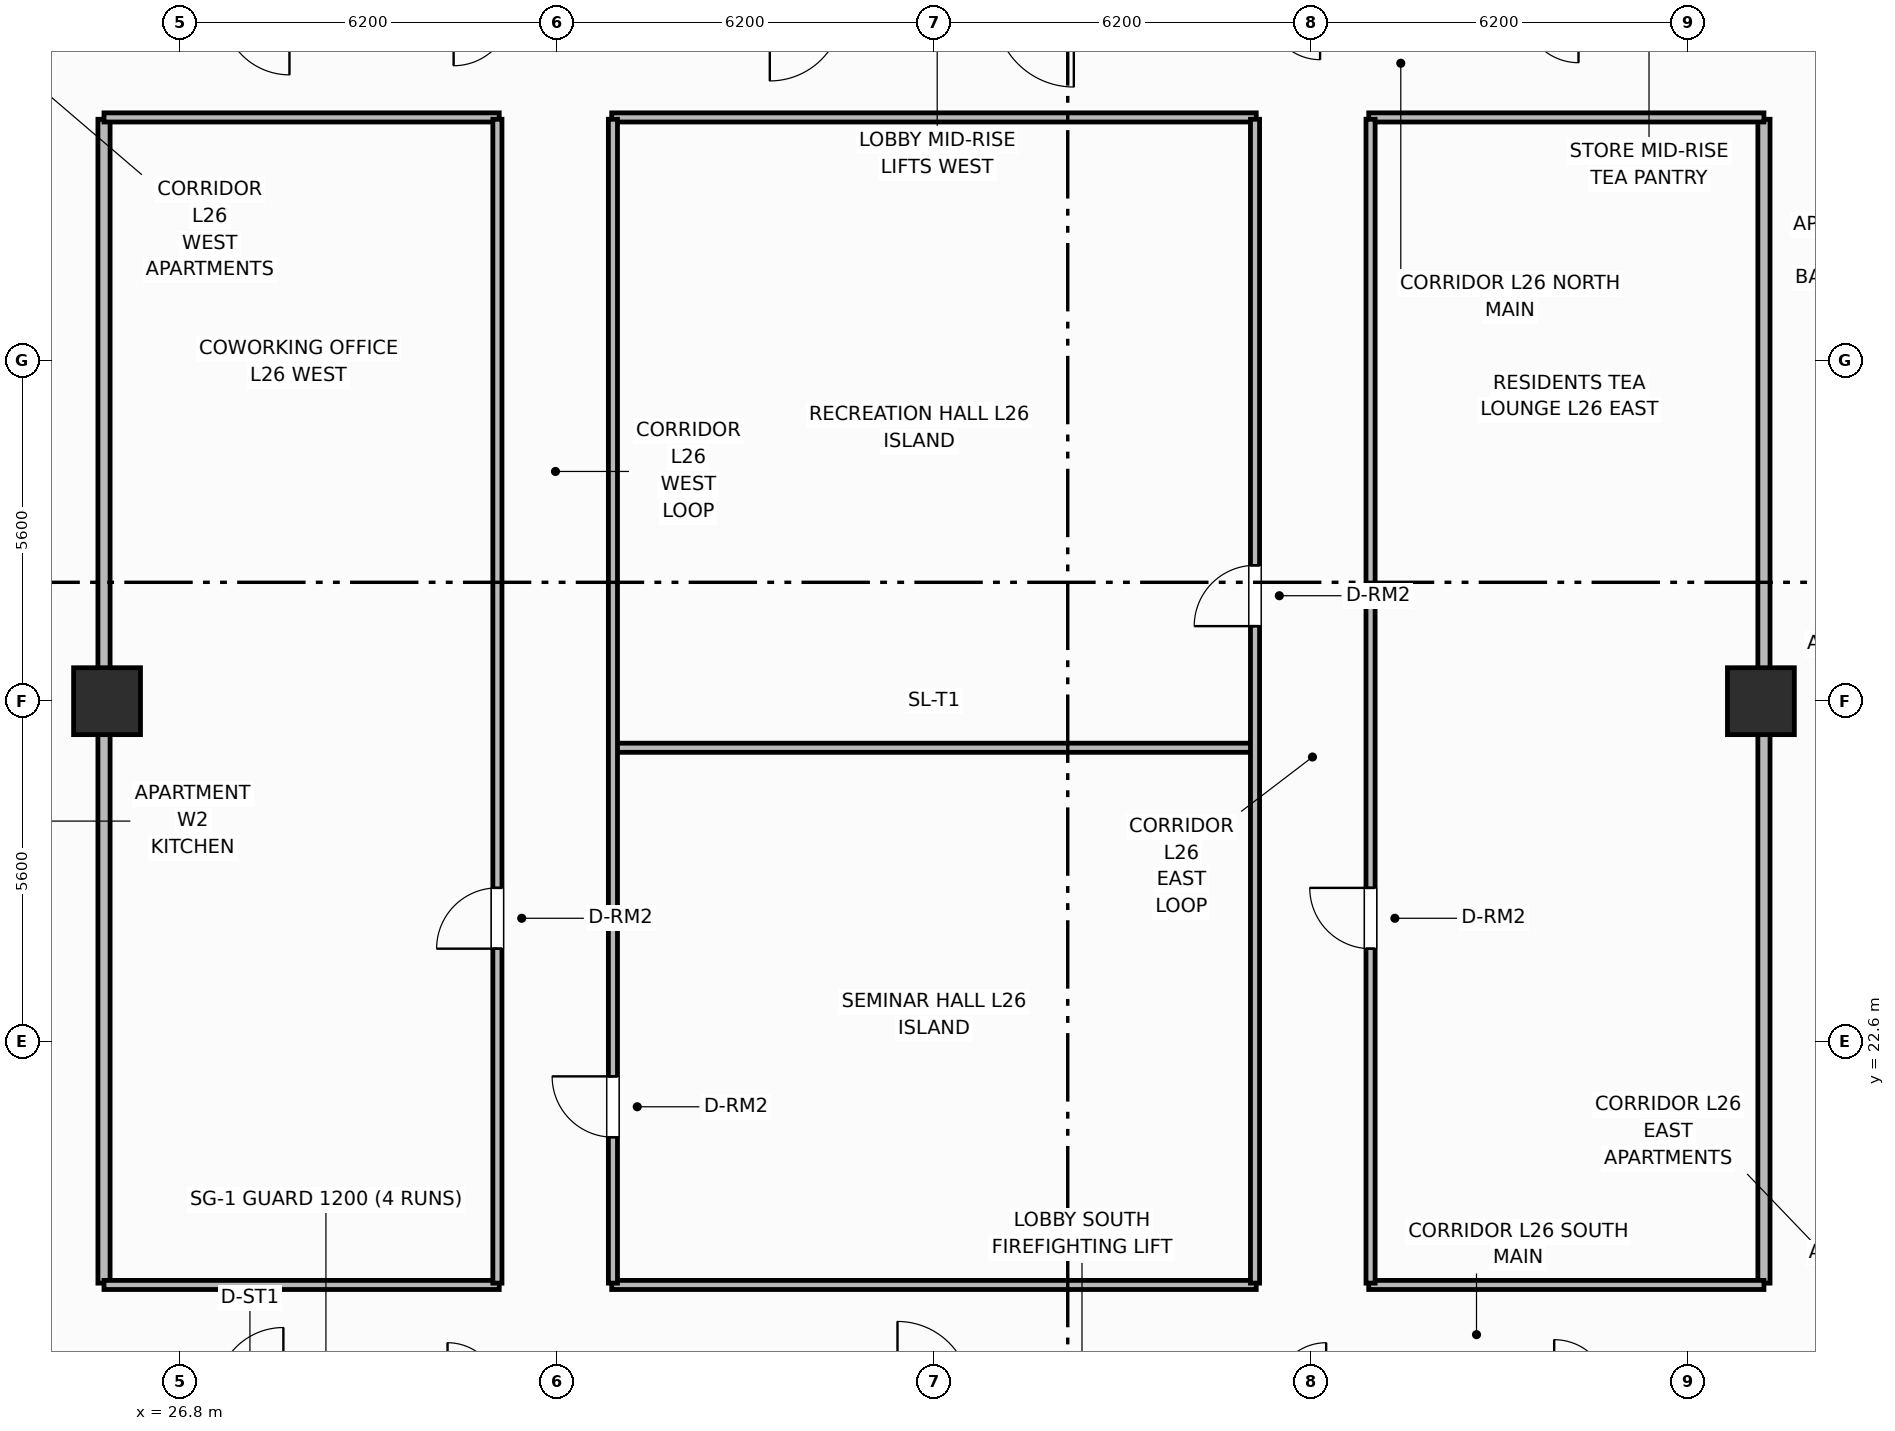
"""IFC4 building model, lengths in metres.
Left out: names, types, materials, properties, quantities, classifications, styles, units other than length and angle.
Written with IfcOpenShell. Run it as: python <this file> out.ifc"""

import sys

from ifc_helpers import new_model, si_unit, direction, frame, frame_2d, origin, origin_2d, place, context, subcontext, project, spatial, rectangle, extrude, element, fill, save


model = new_model("IFC4")
c1 = context("Model", 3, precision=1e-05, world=origin(), true_north=direction((0.0, 1.0)))
c2 = subcontext(c1, "Body", "Model", "MODEL_VIEW")
j1 = project(units=[si_unit("LENGTHUNIT", "METRE"), si_unit("PLANEANGLEUNIT", "RADIAN")], contexts=[c1])
p1 = place(None, origin())
s1 = spatial("IfcSite", under=j1, at=p1, CompositionType="ELEMENT")
p2 = place(p1, origin())
s2 = spatial("IfcBuilding", under=s1, at=p2, CompositionType="ELEMENT")
p3 = place(p2, frame((0.0, 0.0, 106.8)))
s3 = spatial("IfcBuildingStorey", under=s2, at=p3, CompositionType="ELEMENT", Elevation=106.8)
for number, where, z_axis, x_axis in (
    (1, (25.6, 28.2, 0.0), (0.0, 0.0, 1.0), (1.0, 0.0, 0.0)),
    (2, (52.8, 28.2, 0.0), (0.0, 0.0, 1.0), (1.0, 0.0, 0.0)),
):
    element("IfcColumn", number, at=place(p3, frame(where, z_axis=z_axis, x_axis=x_axis)), inside=s3, PredefinedType="COLUMN", context=c2, shape_type="SweptSolid", body=[
        extrude(rectangle(XDim=1.1, YDim=1.1, at=origin_2d()), origin(), (0.0, 0.0, 1.0), 3.7),
    ])
for number, where, z_axis, x_axis in (
    (3, (25.55, 18.63, 0.0), (0.0, 0.0, 1.0), (0.0, 1.0, 0.0)),
    (4, (52.85, 18.63, 0.0), (0.0, 0.0, 1.0), (0.0, 1.0, 0.0)),
):
    element("IfcWall", number, at=place(p3, frame(where, z_axis=z_axis, x_axis=x_axis)), inside=s3, PredefinedType="PARTITIONING", context=c2, shape_type="SweptSolid", body=[
        extrude(rectangle(XDim=19.14, YDim=0.2, at=frame_2d((9.57, 0.0))), origin(), (0.0, 0.0, 1.0), 2.53),
    ])
for number, where, z_axis, x_axis in (
    (5, (25.55, 18.6, 0.0), (0.0, 0.0, 1.0), (1.0, 0.0, 0.0)),
    (6, (25.55, 37.8, 0.0), (0.0, 0.0, 1.0), (1.0, 0.0, 0.0)),
):
    element("IfcWall", number, at=place(p3, frame(where, z_axis=z_axis, x_axis=x_axis)), inside=s3, PredefinedType="PARTITIONING", context=c2, shape_type="SweptSolid", body=[
        extrude(rectangle(XDim=6.5, YDim=0.15, at=frame_2d((3.25, 0.0))), origin(), (0.0, 0.0, 1.0), 2.53),
    ])
for number, where, z_axis, x_axis in (
    (7, (33.9, 18.6, 0.0), (0.0, 0.0, 1.0), (1.0, 0.0, 0.0)),
    (8, (33.9, 37.8, 0.0), (0.0, 0.0, 1.0), (1.0, 0.0, 0.0)),
):
    element("IfcWall", number, at=place(p3, frame(where, z_axis=z_axis, x_axis=x_axis)), inside=s3, PredefinedType="PARTITIONING", context=c2, shape_type="SweptSolid", body=[
        extrude(rectangle(XDim=10.6, YDim=0.15, at=frame_2d((5.3, 0.0))), origin(), (0.0, 0.0, 1.0), 2.53),
    ])
for number, where, z_axis, x_axis in (
    (9, (46.35, 18.6, 0.0), (0.0, 0.0, 1.0), (1.0, 0.0, 0.0)),
    (10, (46.35, 37.8, 0.0), (0.0, 0.0, 1.0), (1.0, 0.0, 0.0)),
):
    element("IfcWall", number, at=place(p3, frame(where, z_axis=z_axis, x_axis=x_axis)), inside=s3, PredefinedType="PARTITIONING", context=c2, shape_type="SweptSolid", body=[
        extrude(rectangle(XDim=6.5, YDim=0.15, at=frame_2d((3.25, 0.0))), origin(), (0.0, 0.0, 1.0), 2.53),
    ])
p4 = place(p3, frame((33.92, 27.434, 0.0), z_axis=(0.0, 0.0, 1.0), x_axis=(1.0, 0.0, 0.0)))
e11 = element("IfcWall", 11, at=p4, inside=s3, PredefinedType="PARTITIONING", context=c2, shape_type="SweptSolid", body=[
    extrude(rectangle(XDim=10.56, YDim=0.15, at=frame_2d((5.28, 0.0))), origin(), (0.0, 0.0, 1.0), 2.53),
])
p5 = place(p3, frame((32.02, 18.63, 0.0), z_axis=(0.0, 0.0, 1.0), x_axis=(0.0, 1.0, 0.0)))
e12 = element("IfcWall", 12, at=p5, inside=s3, PredefinedType="PARTITIONING", context=c2, shape_type="SweptSolid", body=[
    extrude(rectangle(XDim=19.14, YDim=0.15, at=frame_2d((9.57, 0.0))), origin(), (0.0, 0.0, 1.0), 2.53),
])
p6 = place(p5, frame((5.5, 0.0, 0.0)))
e13 = element("IfcOpeningElement", 13, at=p6, cuts=e12, PredefinedType="OPENING", context=c2, shape_type="SweptSolid", body=[
    extrude(rectangle(XDim=1.0, YDim=2.15, at=frame_2d((0.5, 1.075))), frame((0.0, 0.085, 0.0), z_axis=(0.0, -1.0, 0.0), x_axis=(1.0, 0.0, 0.0)), (0.0, 0.0, 1.0), 0.17),
])
p7 = place(p3, frame((33.92, 18.63, 0.0), z_axis=(0.0, 0.0, 1.0), x_axis=(0.0, 1.0, 0.0)))
e14 = element("IfcWall", 14, at=p7, inside=s3, PredefinedType="PARTITIONING", context=c2, shape_type="SweptSolid", body=[
    extrude(rectangle(XDim=19.14, YDim=0.15, at=frame_2d((9.57, 0.0))), origin(), (0.0, 0.0, 1.0), 2.53),
])
p8 = place(p7, frame((2.4, 0.0, 0.0)))
e15 = element("IfcOpeningElement", 15, at=p8, cuts=e14, PredefinedType="OPENING", context=c2, shape_type="SweptSolid", body=[
    extrude(rectangle(XDim=1.0, YDim=2.15, at=frame_2d((0.5, 1.075))), frame((0.0, 0.085, 0.0), z_axis=(0.0, -1.0, 0.0), x_axis=(1.0, 0.0, 0.0)), (0.0, 0.0, 1.0), 0.17),
])
p9 = place(p3, frame((44.48, 18.63, 0.0), z_axis=(0.0, 0.0, 1.0), x_axis=(0.0, 1.0, 0.0)))
e16 = element("IfcWall", 16, at=p9, inside=s3, PredefinedType="PARTITIONING", context=c2, shape_type="SweptSolid", body=[
    extrude(rectangle(XDim=19.14, YDim=0.15, at=frame_2d((9.57, 0.0))), origin(), (0.0, 0.0, 1.0), 2.53),
])
p10 = place(p9, frame((10.804, 0.0, 0.0)))
e17 = element("IfcOpeningElement", 17, at=p10, cuts=e16, PredefinedType="OPENING", context=c2, shape_type="SweptSolid", body=[
    extrude(rectangle(XDim=1.0, YDim=2.15, at=frame_2d((0.5, 1.075))), frame((0.0, 0.085, 0.0), z_axis=(0.0, -1.0, 0.0), x_axis=(1.0, 0.0, 0.0)), (0.0, 0.0, 1.0), 0.17),
])
p11 = place(p3, frame((46.38, 18.63, 0.0), z_axis=(0.0, 0.0, 1.0), x_axis=(0.0, 1.0, 0.0)))
e18 = element("IfcWall", 18, at=p11, inside=s3, PredefinedType="PARTITIONING", context=c2, shape_type="SweptSolid", body=[
    extrude(rectangle(XDim=19.14, YDim=0.15, at=frame_2d((9.57, 0.0))), origin(), (0.0, 0.0, 1.0), 2.53),
])
p12 = place(p11, frame((5.5, 0.0, 0.0)))
e19 = element("IfcOpeningElement", 19, at=p12, cuts=e18, PredefinedType="OPENING", context=c2, shape_type="SweptSolid", body=[
    extrude(rectangle(XDim=1.0, YDim=2.15, at=frame_2d((0.5, 1.075))), frame((0.0, 0.085, 0.0), z_axis=(0.0, -1.0, 0.0), x_axis=(1.0, 0.0, 0.0)), (0.0, 0.0, 1.0), 0.17),
])
p13 = place(p6, origin())
e20 = element("IfcDoor", 20, at=p13, inside=s3, OperationType="SINGLE_SWING_LEFT", PredefinedType="DOOR", context=c2, shape_type="SweptSolid", body=[
    extrude(rectangle(XDim=1.0, YDim=2.15, at=frame_2d((0.5, 1.075))), frame((0.0, 0.025, 0.0), z_axis=(0.0, -1.0, 0.0), x_axis=(1.0, 0.0, 0.0)), (0.0, 0.0, 1.0), 0.05),
])
fill(e13, e20)
p14 = place(p8, origin())
e21 = element("IfcDoor", 21, at=p14, inside=s3, OperationType="SINGLE_SWING_RIGHT", PredefinedType="DOOR", context=c2, shape_type="SweptSolid", body=[
    extrude(rectangle(XDim=1.0, YDim=2.15, at=frame_2d((0.5, 1.075))), frame((0.0, 0.025, 0.0), z_axis=(0.0, -1.0, 0.0), x_axis=(1.0, 0.0, 0.0)), (0.0, 0.0, 1.0), 0.05),
])
fill(e15, e21)
p15 = place(p10, origin())
e22 = element("IfcDoor", 22, at=p15, inside=s3, OperationType="SINGLE_SWING_LEFT", PredefinedType="DOOR", context=c2, shape_type="SweptSolid", body=[
    extrude(rectangle(XDim=1.0, YDim=2.15, at=frame_2d((0.5, 1.075))), frame((0.0, 0.025, 0.0), z_axis=(0.0, -1.0, 0.0), x_axis=(1.0, 0.0, 0.0)), (0.0, 0.0, 1.0), 0.05),
])
fill(e17, e22)
p16 = place(p12, origin())
e23 = element("IfcDoor", 23, at=p16, inside=s3, OperationType="SINGLE_SWING_RIGHT", PredefinedType="DOOR", context=c2, shape_type="SweptSolid", body=[
    extrude(rectangle(XDim=1.0, YDim=2.15, at=frame_2d((0.5, 1.075))), frame((0.0, 0.025, 0.0), z_axis=(0.0, -1.0, 0.0), x_axis=(1.0, 0.0, 0.0)), (0.0, 0.0, 1.0), 0.05),
])
fill(e19, e23)
save(model, sys.argv[1])
